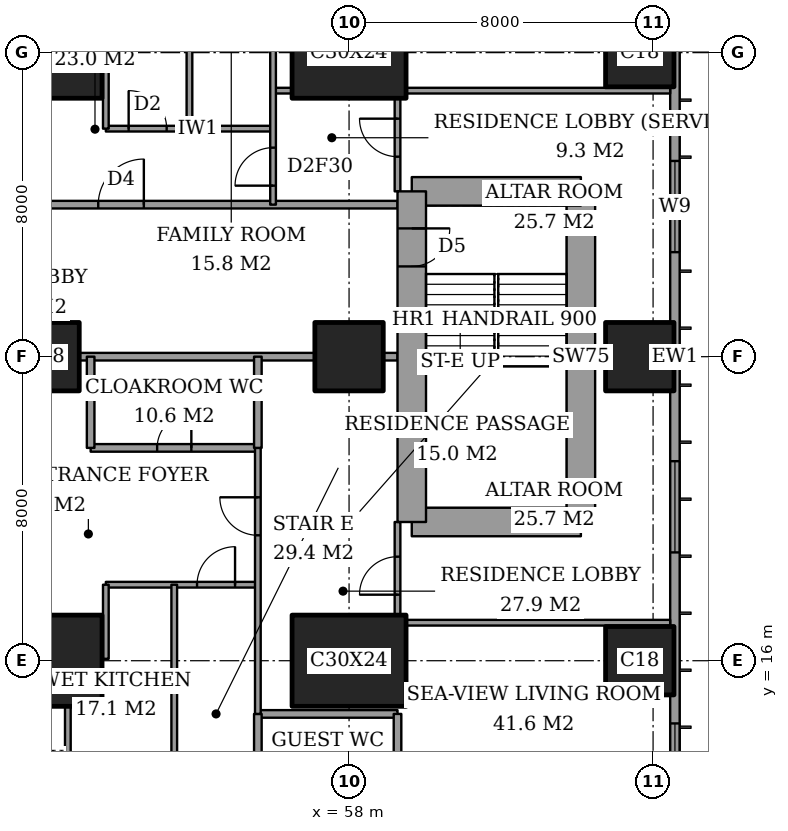
"""IFC4 building model, lengths in metres.
Left out: names, types, materials, properties, quantities, classifications, styles, units other than length and angle.
Written with IfcOpenShell. Run it as: python <this file> out.ifc"""

import sys

from ifc_helpers import new_model, si_unit, direction, frame, frame_2d, origin, origin_2d, place, context, subcontext, project, spatial, rectangle, extrude, element, fill, save


model = new_model("IFC4")
c1 = context("Model", 3, precision=1e-05, world=origin(), true_north=direction((0.0, 1.0)))
c2 = subcontext(c1, "Body", "Model", "MODEL_VIEW")
j1 = project(units=[si_unit("LENGTHUNIT", "METRE"), si_unit("PLANEANGLEUNIT", "RADIAN")], contexts=[c1])
p1 = place(None, origin())
s1 = spatial("IfcSite", under=j1, at=p1, CompositionType="ELEMENT")
p2 = place(p1, origin())
s2 = spatial("IfcBuilding", under=s1, at=p2, CompositionType="ELEMENT")
p3 = place(p2, frame((0.0, 0.0, 203.8)))
s3 = spatial("IfcBuildingStorey", under=s2, at=p3, CompositionType="ELEMENT", Elevation=203.8)
p4 = place(p3, frame((50.0, 16.0, 0.0), z_axis=(0.0, 0.0, 1.0), x_axis=(1.0, 0.0, 0.0)))
e1 = element("IfcColumn", 1, at=p4, inside=s3, PredefinedType="COLUMN", context=c2, shape_type="SweptSolid", body=[
    extrude(rectangle(XDim=3.0, YDim=2.4, at=origin_2d()), origin(), (0.0, 0.0, 1.0), 3.6),
])
p5 = place(p3, frame((50.0, 24.0, 0.0), z_axis=(0.0, 0.0, 1.0), x_axis=(1.0, 0.0, 0.0)))
e2 = element("IfcColumn", 2, at=p5, inside=s3, PredefinedType="COLUMN", context=c2, shape_type="SweptSolid", body=[
    extrude(rectangle(XDim=1.8, YDim=1.8, at=origin_2d()), origin(), (0.0, 0.0, 1.0), 3.6),
])
for number, where, z_axis, x_axis in (
    (3, (50.0, 32.0, 0.0), (0.0, 0.0, 1.0), (1.0, 0.0, 0.0)),
    (4, (58.0, 16.0, 0.0), (0.0, 0.0, 1.0), (1.0, 0.0, 0.0)),
):
    element("IfcColumn", number, at=place(p3, frame(where, z_axis=z_axis, x_axis=x_axis)), inside=s3, PredefinedType="COLUMN", context=c2, shape_type="SweptSolid", body=[
        extrude(rectangle(XDim=3.0, YDim=2.4, at=origin_2d()), origin(), (0.0, 0.0, 1.0), 3.6),
    ])
p6 = place(p3, frame((58.0, 24.0, 0.0), z_axis=(0.0, 0.0, 1.0), x_axis=(1.0, 0.0, 0.0)))
e5 = element("IfcColumn", 5, at=p6, inside=s3, PredefinedType="COLUMN", context=c2, shape_type="SweptSolid", body=[
    extrude(rectangle(XDim=1.8, YDim=1.8, at=origin_2d()), origin(), (0.0, 0.0, 1.0), 3.6),
])
p7 = place(p3, frame((58.0, 32.0, 0.0), z_axis=(0.0, 0.0, 1.0), x_axis=(1.0, 0.0, 0.0)))
e6 = element("IfcColumn", 6, at=p7, inside=s3, PredefinedType="COLUMN", context=c2, shape_type="SweptSolid", body=[
    extrude(rectangle(XDim=3.0, YDim=2.4, at=origin_2d()), origin(), (0.0, 0.0, 1.0), 3.6),
])
for number, where, z_axis, x_axis in (
    (7, (65.65, 16.0, 0.0), (0.0, 0.0, 1.0), (1.0, 0.0, 0.0)),
    (8, (65.65, 24.0, 0.0), (0.0, 0.0, 1.0), (1.0, 0.0, 0.0)),
    (9, (65.65, 32.0, 0.0), (0.0, 0.0, 1.0), (1.0, 0.0, 0.0)),
):
    element("IfcColumn", number, at=place(p3, frame(where, z_axis=z_axis, x_axis=x_axis)), inside=s3, PredefinedType="COLUMN", context=c2, shape_type="SweptSolid", body=[
        extrude(rectangle(XDim=1.8, YDim=1.8, at=origin_2d()), origin(), (0.0, 0.0, 1.0), 3.6),
    ])
p8 = place(p3, frame((59.65, 19.65, 0.0), z_axis=(0.0, 0.0, 1.0), x_axis=(1.0, 0.0, 0.0)))
e10 = element("IfcWall", 10, at=p8, inside=s3, PredefinedType="SHEAR", context=c2, shape_type="SweptSolid", body=[
    extrude(rectangle(XDim=4.45, YDim=0.75, at=frame_2d((2.225, 0.0))), origin(), (0.0, 0.0, 1.0), 3.6),
])
p9 = place(p3, frame((64.1, 19.65, 0.0), z_axis=(0.0, 0.0, 1.0), x_axis=(0.0, 1.0, 0.0)))
e11 = element("IfcWall", 11, at=p9, inside=s3, PredefinedType="SHEAR", context=c2, shape_type="SweptSolid", body=[
    extrude(rectangle(XDim=8.7, YDim=0.75, at=frame_2d((4.35, 0.0))), origin(), (0.0, 0.0, 1.0), 3.6),
])
p10 = place(p3, frame((64.1, 28.35, 0.0), z_axis=(0.0, 0.0, 1.0), x_axis=(-1.0, 0.0, 0.0)))
e12 = element("IfcWall", 12, at=p10, inside=s3, PredefinedType="SHEAR", context=c2, shape_type="SweptSolid", body=[
    extrude(rectangle(XDim=4.45, YDim=0.75, at=frame_2d((2.225, 0.0))), origin(), (0.0, 0.0, 1.0), 3.6),
])
p11 = place(p3, frame((59.65, 28.35, 0.0), z_axis=(0.0, 0.0, 1.0), x_axis=(0.0, -1.0, 0.0)))
e13 = element("IfcWall", 13, at=p11, inside=s3, PredefinedType="SHEAR", context=c2, shape_type="SweptSolid", body=[
    extrude(rectangle(XDim=8.7, YDim=0.75, at=frame_2d((4.35, 0.0))), origin(), (0.0, 0.0, 1.0), 3.6),
])
p12 = place(p11, frame((0.975, 0.0, 0.0)))
e14 = element("IfcOpeningElement", 14, at=p12, cuts=e13, PredefinedType="OPENING", context=c2, shape_type="SweptSolid", body=[
    extrude(rectangle(XDim=1.0, YDim=2.1, at=frame_2d((0.5, 1.05))), frame((0.0, 0.385, 0.0), z_axis=(0.0, -1.0, 0.0), x_axis=(1.0, 0.0, 0.0)), (0.0, 0.0, 1.0), 0.77),
])
p13 = place(p3, frame((66.575, 3.175, 0.0), z_axis=(0.0, 0.0, 1.0), x_axis=(0.0, 1.0, 0.0)))
e15 = element("IfcWall", 15, at=p13, inside=s3, PredefinedType="SOLIDWALL", context=c2, shape_type="SweptSolid", body=[
    extrude(rectangle(XDim=41.65, YDim=0.25, at=frame_2d((20.825, 0.0))), origin(), (0.0, 0.0, 1.0), 3.6),
])
p14 = place(p13, frame((0.825, 0.0, 0.2)))
e16 = element("IfcOpeningElement", 16, at=p14, cuts=e15, PredefinedType="OPENING", context=c2, shape_type="SweptSolid", body=[
    extrude(rectangle(XDim=2.4, YDim=2.4, at=frame_2d((1.2, 1.2))), frame((0.0, 0.135, 0.0), z_axis=(0.0, -1.0, 0.0), x_axis=(1.0, 0.0, 0.0)), (0.0, 0.0, 1.0), 0.27),
])
p15 = place(p13, frame((6.6, 0.0, 0.2)))
e17 = element("IfcOpeningElement", 17, at=p15, cuts=e15, PredefinedType="OPENING", context=c2, shape_type="SweptSolid", body=[
    extrude(rectangle(XDim=1.2, YDim=2.4, at=frame_2d((0.6, 1.2))), frame((0.0, 0.135, 0.0), z_axis=(0.0, -1.0, 0.0), x_axis=(1.0, 0.0, 0.0)), (0.0, 0.0, 1.0), 0.27),
])
p16 = place(p13, frame((8.775, 0.0, 0.2)))
e18 = element("IfcOpeningElement", 18, at=p16, cuts=e15, PredefinedType="OPENING", context=c2, shape_type="SweptSolid", body=[
    extrude(rectangle(XDim=2.4, YDim=2.4, at=frame_2d((1.2, 1.2))), frame((0.0, 0.135, 0.0), z_axis=(0.0, -1.0, 0.0), x_axis=(1.0, 0.0, 0.0)), (0.0, 0.0, 1.0), 0.27),
])
p17 = place(p13, frame((15.675, 0.0, 0.2)))
e19 = element("IfcOpeningElement", 19, at=p17, cuts=e15, PredefinedType="OPENING", context=c2, shape_type="SweptSolid", body=[
    extrude(rectangle(XDim=2.4, YDim=2.4, at=frame_2d((1.2, 1.2))), frame((0.0, 0.135, 0.0), z_axis=(0.0, -1.0, 0.0), x_axis=(1.0, 0.0, 0.0)), (0.0, 0.0, 1.0), 0.27),
])
p18 = place(p13, frame((23.575, 0.0, 0.2)))
e20 = element("IfcOpeningElement", 20, at=p18, cuts=e15, PredefinedType="OPENING", context=c2, shape_type="SweptSolid", body=[
    extrude(rectangle(XDim=2.4, YDim=2.4, at=frame_2d((1.2, 1.2))), frame((0.0, 0.135, 0.0), z_axis=(0.0, -1.0, 0.0), x_axis=(1.0, 0.0, 0.0)), (0.0, 0.0, 1.0), 0.27),
])
p19 = place(p13, frame((30.675, 0.0, 0.2)))
e21 = element("IfcOpeningElement", 21, at=p19, cuts=e15, PredefinedType="OPENING", context=c2, shape_type="SweptSolid", body=[
    extrude(rectangle(XDim=2.4, YDim=2.4, at=frame_2d((1.2, 1.2))), frame((0.0, 0.135, 0.0), z_axis=(0.0, -1.0, 0.0), x_axis=(1.0, 0.0, 0.0)), (0.0, 0.0, 1.0), 0.27),
])
p20 = place(p13, frame((34.325, 0.0, 0.2)))
e22 = element("IfcOpeningElement", 22, at=p20, cuts=e15, PredefinedType="OPENING", context=c2, shape_type="SweptSolid", body=[
    extrude(rectangle(XDim=1.2, YDim=2.4, at=frame_2d((0.6, 1.2))), frame((0.0, 0.135, 0.0), z_axis=(0.0, -1.0, 0.0), x_axis=(1.0, 0.0, 0.0)), (0.0, 0.0, 1.0), 0.27),
])
p21 = place(p13, frame((38.425, 0.0, 0.2)))
e23 = element("IfcOpeningElement", 23, at=p21, cuts=e15, PredefinedType="OPENING", context=c2, shape_type="SweptSolid", body=[
    extrude(rectangle(XDim=2.4, YDim=2.4, at=frame_2d((1.2, 1.2))), frame((0.0, 0.135, 0.0), z_axis=(0.0, -1.0, 0.0), x_axis=(1.0, 0.0, 0.0)), (0.0, 0.0, 1.0), 0.27),
])
p22 = place(p3, frame((55.6, 14.6, 0.0), z_axis=(0.0, 0.0, 1.0), x_axis=(1.0, 0.0, 0.0)))
e24 = element("IfcWall", 24, at=p22, inside=s3, PredefinedType="PARTITIONING", context=c2, shape_type="SweptSolid", body=[
    extrude(rectangle(XDim=3.675, YDim=0.2, at=frame_2d((1.837, 0.0))), origin(), (0.0, 0.0, 1.0), 3.35),
])
p23 = place(p3, frame((59.5, 17.0, 0.0), z_axis=(0.0, 0.0, 1.0), x_axis=(1.0, 0.0, 0.0)))
e25 = element("IfcWall", 25, at=p23, inside=s3, PredefinedType="PARTITIONING", context=c2, shape_type="SweptSolid", body=[
    extrude(rectangle(XDim=6.95, YDim=0.15, at=frame_2d((3.475, 0.0))), origin(), (0.0, 0.0, 1.0), 3.35),
])
p24 = place(p3, frame((51.6, 18.0, 0.0), z_axis=(0.0, 0.0, 1.0), x_axis=(1.0, 0.0, 0.0)))
e26 = element("IfcWall", 26, at=p24, inside=s3, PredefinedType="PARTITIONING", context=c2, shape_type="SweptSolid", body=[
    extrude(rectangle(XDim=4.0, YDim=0.15, at=frame_2d((2.0, 0.0))), origin(), (0.0, 0.0, 1.0), 3.35),
])
p25 = place(p24, frame((2.4, 0.0, 0.0)))
e27 = element("IfcOpeningElement", 27, at=p25, cuts=e26, PredefinedType="OPENING", context=c2, shape_type="SweptSolid", body=[
    extrude(rectangle(XDim=1.0, YDim=2.1, at=frame_2d((0.5, 1.05))), frame((0.0, 0.085, 0.0), z_axis=(0.0, -1.0, 0.0), x_axis=(1.0, 0.0, 0.0)), (0.0, 0.0, 1.0), 0.17),
])
p26 = place(p3, frame((51.2, 21.6, 0.0), z_axis=(0.0, 0.0, 1.0), x_axis=(1.0, 0.0, 0.0)))
e28 = element("IfcWall", 28, at=p26, inside=s3, PredefinedType="PARTITIONING", context=c2, shape_type="SweptSolid", body=[
    extrude(rectangle(XDim=4.4, YDim=0.2, at=frame_2d((2.2, 0.0))), origin(), (0.0, 0.0, 1.0), 3.35),
])
p27 = place(p26, frame((1.75, 0.0, 0.0)))
e29 = element("IfcOpeningElement", 29, at=p27, cuts=e28, PredefinedType="OPENING", context=c2, shape_type="SweptSolid", body=[
    extrude(rectangle(XDim=0.9, YDim=2.1, at=frame_2d((0.45, 1.05))), frame((0.0, 0.11, 0.0), z_axis=(0.0, -1.0, 0.0), x_axis=(1.0, 0.0, 0.0)), (0.0, 0.0, 1.0), 0.22),
])
p28 = place(p3, frame((50.9, 24.0, 0.0), z_axis=(0.0, 0.0, 1.0), x_axis=(1.0, 0.0, 0.0)))
e30 = element("IfcWall", 30, at=p28, inside=s3, PredefinedType="PARTITIONING", context=c2, shape_type="SweptSolid", body=[
    extrude(rectangle(XDim=6.2, YDim=0.2, at=frame_2d((3.1, 0.0))), origin(), (0.0, 0.0, 1.0), 3.35),
])
p29 = place(p3, frame((58.9, 24.0, 0.0), z_axis=(0.0, 0.0, 1.0), x_axis=(1.0, 0.0, 0.0)))
e31 = element("IfcWall", 31, at=p29, inside=s3, PredefinedType="PARTITIONING", context=c2, shape_type="SweptSolid", body=[
    extrude(rectangle(XDim=0.375, YDim=0.2, at=frame_2d((0.188, 0.0))), origin(), (0.0, 0.0, 1.0), 3.35),
])
p30 = place(p3, frame((42.0, 28.0, 0.0), z_axis=(0.0, 0.0, 1.0), x_axis=(1.0, 0.0, 0.0)))
e32 = element("IfcWall", 32, at=p30, inside=s3, PredefinedType="PARTITIONING", context=c2, shape_type="SweptSolid", body=[
    extrude(rectangle(XDim=17.275, YDim=0.2, at=frame_2d((8.637, 0.0))), origin(), (0.0, 0.0, 1.0), 3.35),
])
p31 = place(p30, frame((9.4, 0.0, 0.0)))
e33 = element("IfcOpeningElement", 33, at=p31, cuts=e32, PredefinedType="OPENING", context=c2, shape_type="SweptSolid", body=[
    extrude(rectangle(XDim=1.2, YDim=2.4, at=frame_2d((0.6, 1.2))), frame((0.0, 0.11, 0.0), z_axis=(0.0, -1.0, 0.0), x_axis=(1.0, 0.0, 0.0)), (0.0, 0.0, 1.0), 0.22),
])
p32 = place(p3, frame((51.6, 30.0, 0.0), z_axis=(0.0, 0.0, 1.0), x_axis=(1.0, 0.0, 0.0)))
e34 = element("IfcWall", 34, at=p32, inside=s3, PredefinedType="PARTITIONING", context=c2, shape_type="SweptSolid", body=[
    extrude(rectangle(XDim=4.4, YDim=0.15, at=frame_2d((2.2, 0.0))), origin(), (0.0, 0.0, 1.0), 3.35),
])
p33 = place(p32, frame((0.6, 0.0, 0.0)))
e35 = element("IfcOpeningElement", 35, at=p33, cuts=e34, PredefinedType="OPENING", context=c2, shape_type="SweptSolid", body=[
    extrude(rectangle(XDim=1.0, YDim=2.1, at=frame_2d((0.5, 1.05))), frame((0.0, 0.085, 0.0), z_axis=(0.0, -1.0, 0.0), x_axis=(1.0, 0.0, 0.0)), (0.0, 0.0, 1.0), 0.17),
])
p34 = place(p3, frame((56.0, 31.0, 0.0), z_axis=(0.0, 0.0, 1.0), x_axis=(1.0, 0.0, 0.0)))
e36 = element("IfcWall", 36, at=p34, inside=s3, PredefinedType="PARTITIONING", context=c2, shape_type="SweptSolid", body=[
    extrude(rectangle(XDim=0.5, YDim=0.15, at=frame_2d((0.25, 0.0))), origin(), (0.0, 0.0, 1.0), 3.35),
])
p35 = place(p3, frame((59.5, 31.0, 0.0), z_axis=(0.0, 0.0, 1.0), x_axis=(1.0, 0.0, 0.0)))
e37 = element("IfcWall", 37, at=p35, inside=s3, PredefinedType="PARTITIONING", context=c2, shape_type="SweptSolid", body=[
    extrude(rectangle(XDim=6.95, YDim=0.15, at=frame_2d((3.475, 0.0))), origin(), (0.0, 0.0, 1.0), 3.35),
])
p36 = place(p3, frame((50.6, 11.2, 0.0), z_axis=(0.0, 0.0, 1.0), x_axis=(0.0, 1.0, 0.0)))
e38 = element("IfcWall", 38, at=p36, inside=s3, PredefinedType="PARTITIONING", context=c2, shape_type="SweptSolid", body=[
    extrude(rectangle(XDim=3.6, YDim=0.15, at=frame_2d((1.8, 0.0))), origin(), (0.0, 0.0, 1.0), 3.35),
])
p37 = place(p3, frame((51.2, 21.6, 0.0), z_axis=(0.0, 0.0, 1.0), x_axis=(0.0, 1.0, 0.0)))
e39 = element("IfcWall", 39, at=p37, inside=s3, PredefinedType="PARTITIONING", context=c2, shape_type="SweptSolid", body=[
    extrude(rectangle(XDim=2.4, YDim=0.2, at=frame_2d((1.2, 0.0))), origin(), (0.0, 0.0, 1.0), 3.35),
])
p38 = place(p3, frame((51.6, 16.05, 0.0), z_axis=(0.0, 0.0, 1.0), x_axis=(0.0, 1.0, 0.0)))
e40 = element("IfcWall", 40, at=p38, inside=s3, PredefinedType="PARTITIONING", context=c2, shape_type="SweptSolid", body=[
    extrude(rectangle(XDim=1.95, YDim=0.15, at=frame_2d((0.975, 0.0))), origin(), (0.0, 0.0, 1.0), 3.35),
])
p39 = place(p3, frame((51.6, 30.0, 0.0), z_axis=(0.0, 0.0, 1.0), x_axis=(0.0, 1.0, 0.0)))
e41 = element("IfcWall", 41, at=p39, inside=s3, PredefinedType="PARTITIONING", context=c2, shape_type="SweptSolid", body=[
    extrude(rectangle(XDim=7.2, YDim=0.15, at=frame_2d((3.6, 0.0))), origin(), (0.0, 0.0, 1.0), 3.35),
])
p40 = place(p3, frame((53.4, 11.2, 0.0), z_axis=(0.0, 0.0, 1.0), x_axis=(0.0, 1.0, 0.0)))
e42 = element("IfcWall", 42, at=p40, inside=s3, PredefinedType="PARTITIONING", context=c2, shape_type="SweptSolid", body=[
    extrude(rectangle(XDim=6.8, YDim=0.15, at=frame_2d((3.4, 0.0))), origin(), (0.0, 0.0, 1.0), 3.35),
])
p41 = place(p3, frame((53.8, 30.0, 0.0), z_axis=(0.0, 0.0, 1.0), x_axis=(0.0, 1.0, 0.0)))
e43 = element("IfcWall", 43, at=p41, inside=s3, PredefinedType="PARTITIONING", context=c2, shape_type="SweptSolid", body=[
    extrude(rectangle(XDim=7.2, YDim=0.15, at=frame_2d((3.6, 0.0))), origin(), (0.0, 0.0, 1.0), 3.35),
])
p42 = place(p3, frame((55.6, 11.2, 0.0), z_axis=(0.0, 0.0, 1.0), x_axis=(0.0, 1.0, 0.0)))
e44 = element("IfcWall", 44, at=p42, inside=s3, PredefinedType="PARTITIONING", context=c2, shape_type="SweptSolid", body=[
    extrude(rectangle(XDim=3.4, YDim=0.2, at=frame_2d((1.7, 0.0))), origin(), (0.0, 0.0, 1.0), 3.35),
])
p43 = place(p3, frame((55.6, 21.6, 0.0), z_axis=(0.0, 0.0, 1.0), x_axis=(0.0, 1.0, 0.0)))
e45 = element("IfcWall", 45, at=p43, inside=s3, PredefinedType="PARTITIONING", context=c2, shape_type="SweptSolid", body=[
    extrude(rectangle(XDim=2.4, YDim=0.2, at=frame_2d((1.2, 0.0))), origin(), (0.0, 0.0, 1.0), 3.35),
])
p44 = place(p3, frame((55.6, 14.6, 0.0), z_axis=(0.0, 0.0, 1.0), x_axis=(0.0, 1.0, 0.0)))
e46 = element("IfcWall", 46, at=p44, inside=s3, PredefinedType="PARTITIONING", context=c2, shape_type="SweptSolid", body=[
    extrude(rectangle(XDim=7.0, YDim=0.15, at=frame_2d((3.5, 0.0))), origin(), (0.0, 0.0, 1.0), 3.35),
])
p45 = place(p44, frame((4.7, 0.0, 0.0)))
e47 = element("IfcOpeningElement", 47, at=p45, cuts=e46, PredefinedType="OPENING", context=c2, shape_type="SweptSolid", body=[
    extrude(rectangle(XDim=1.0, YDim=2.1, at=frame_2d((0.5, 1.05))), frame((0.0, 0.085, 0.0), z_axis=(0.0, -1.0, 0.0), x_axis=(1.0, 0.0, 0.0)), (0.0, 0.0, 1.0), 0.17),
])
p46 = place(p3, frame((56.0, 28.0, 0.0), z_axis=(0.0, 0.0, 1.0), x_axis=(0.0, 1.0, 0.0)))
e48 = element("IfcWall", 48, at=p46, inside=s3, PredefinedType="PARTITIONING", context=c2, shape_type="SweptSolid", body=[
    extrude(rectangle(XDim=9.2, YDim=0.15, at=frame_2d((4.6, 0.0))), origin(), (0.0, 0.0, 1.0), 3.35),
])
p47 = place(p46, frame((0.5, 0.0, 0.0)))
e49 = element("IfcOpeningElement", 49, at=p47, cuts=e48, PredefinedType="OPENING", context=c2, shape_type="SweptSolid", body=[
    extrude(rectangle(XDim=1.0, YDim=2.1, at=frame_2d((0.5, 1.05))), frame((0.0, 0.085, 0.0), z_axis=(0.0, -1.0, 0.0), x_axis=(1.0, 0.0, 0.0)), (0.0, 0.0, 1.0), 0.17),
])
p48 = place(p3, frame((59.275, 11.2, 0.0), z_axis=(0.0, 0.0, 1.0), x_axis=(0.0, 1.0, 0.0)))
e50 = element("IfcWall", 50, at=p48, inside=s3, PredefinedType="PARTITIONING", context=c2, shape_type="SweptSolid", body=[
    extrude(rectangle(XDim=3.4, YDim=0.2, at=frame_2d((1.7, 0.0))), origin(), (0.0, 0.0, 1.0), 3.35),
])
p49 = place(p3, frame((59.275, 17.2, 0.0), z_axis=(0.0, 0.0, 1.0), x_axis=(0.0, 1.0, 0.0)))
e51 = element("IfcWall", 51, at=p49, inside=s3, PredefinedType="PARTITIONING", context=c2, shape_type="SweptSolid", body=[
    extrude(rectangle(XDim=2.45, YDim=0.15, at=frame_2d((1.225, 0.0))), origin(), (0.0, 0.0, 1.0), 3.35),
])
p50 = place(p49, frame((0.538, 0.0, 0.0)))
e52 = element("IfcOpeningElement", 52, at=p50, cuts=e51, PredefinedType="OPENING", context=c2, shape_type="SweptSolid", body=[
    extrude(rectangle(XDim=1.0, YDim=2.1, at=frame_2d((0.5, 1.05))), frame((0.0, 0.085, 0.0), z_axis=(0.0, -1.0, 0.0), x_axis=(1.0, 0.0, 0.0)), (0.0, 0.0, 1.0), 0.17),
])
p51 = place(p3, frame((59.275, 28.35, 0.0), z_axis=(0.0, 0.0, 1.0), x_axis=(0.0, 1.0, 0.0)))
e53 = element("IfcWall", 53, at=p51, inside=s3, PredefinedType="PARTITIONING", context=c2, shape_type="SweptSolid", body=[
    extrude(rectangle(XDim=2.45, YDim=0.15, at=frame_2d((1.225, 0.0))), origin(), (0.0, 0.0, 1.0), 3.35),
])
p52 = place(p51, frame((0.913, 0.0, 0.0)))
e54 = element("IfcOpeningElement", 54, at=p52, cuts=e53, PredefinedType="OPENING", context=c2, shape_type="SweptSolid", body=[
    extrude(rectangle(XDim=1.0, YDim=2.1, at=frame_2d((0.5, 1.05))), frame((0.0, 0.085, 0.0), z_axis=(0.0, -1.0, 0.0), x_axis=(1.0, 0.0, 0.0)), (0.0, 0.0, 1.0), 0.17),
])
p53 = place(p16, origin())
e55 = element("IfcWindow", 55, at=p53, inside=s3, PartitioningType="SINGLE_PANEL", PredefinedType="WINDOW", context=c2, shape_type="SweptSolid", body=[
    extrude(rectangle(XDim=2.4, YDim=2.4, at=frame_2d((1.2, 1.2))), frame((0.0, 0.03, 0.0), z_axis=(0.0, -1.0, 0.0), x_axis=(1.0, 0.0, 0.0)), (0.0, 0.0, 1.0), 0.06),
])
fill(e18, e55)
p54 = place(p17, origin())
e56 = element("IfcWindow", 56, at=p54, inside=s3, PartitioningType="SINGLE_PANEL", PredefinedType="WINDOW", context=c2, shape_type="SweptSolid", body=[
    extrude(rectangle(XDim=2.4, YDim=2.4, at=frame_2d((1.2, 1.2))), frame((0.0, 0.03, 0.0), z_axis=(0.0, -1.0, 0.0), x_axis=(1.0, 0.0, 0.0)), (0.0, 0.0, 1.0), 0.06),
])
fill(e19, e56)
p55 = place(p18, origin())
e57 = element("IfcWindow", 57, at=p55, inside=s3, PartitioningType="SINGLE_PANEL", PredefinedType="WINDOW", context=c2, shape_type="SweptSolid", body=[
    extrude(rectangle(XDim=2.4, YDim=2.4, at=frame_2d((1.2, 1.2))), frame((0.0, 0.03, 0.0), z_axis=(0.0, -1.0, 0.0), x_axis=(1.0, 0.0, 0.0)), (0.0, 0.0, 1.0), 0.06),
])
fill(e20, e57)
p56 = place(p50, origin())
e58 = element("IfcDoor", 58, at=p56, inside=s3, OperationType="SINGLE_SWING_RIGHT", PredefinedType="DOOR", context=c2, shape_type="SweptSolid", body=[
    extrude(rectangle(XDim=1.0, YDim=2.1, at=frame_2d((0.5, 1.05))), frame((0.0, 0.025, 0.0), z_axis=(0.0, -1.0, 0.0), x_axis=(1.0, 0.0, 0.0)), (0.0, 0.0, 1.0), 0.05),
])
fill(e52, e58)
p57 = place(p45, origin())
e59 = element("IfcDoor", 59, at=p57, inside=s3, OperationType="SINGLE_SWING_LEFT", PredefinedType="DOOR", context=c2, shape_type="SweptSolid", body=[
    extrude(rectangle(XDim=1.0, YDim=2.1, at=frame_2d((0.5, 1.05))), frame((0.0, 0.025, 0.0), z_axis=(0.0, -1.0, 0.0), x_axis=(1.0, 0.0, 0.0)), (0.0, 0.0, 1.0), 0.05),
])
fill(e47, e59)
p58 = place(p27, origin())
e60 = element("IfcDoor", 60, at=p58, inside=s3, OperationType="SINGLE_SWING_LEFT", PredefinedType="DOOR", context=c2, shape_type="SweptSolid", body=[
    extrude(rectangle(XDim=0.9, YDim=2.1, at=frame_2d((0.45, 1.05))), frame((0.0, 0.025, 0.0), z_axis=(0.0, -1.0, 0.0), x_axis=(1.0, 0.0, 0.0)), (0.0, 0.0, 1.0), 0.05),
])
fill(e29, e60)
p59 = place(p25, origin())
e61 = element("IfcDoor", 61, at=p59, inside=s3, OperationType="SINGLE_SWING_LEFT", PredefinedType="DOOR", context=c2, shape_type="SweptSolid", body=[
    extrude(rectangle(XDim=1.0, YDim=2.1, at=frame_2d((0.5, 1.05))), frame((0.0, 0.025, 0.0), z_axis=(0.0, -1.0, 0.0), x_axis=(1.0, 0.0, 0.0)), (0.0, 0.0, 1.0), 0.05),
])
fill(e27, e61)
p60 = place(p52, origin())
e62 = element("IfcDoor", 62, at=p60, inside=s3, OperationType="SINGLE_SWING_LEFT", PredefinedType="DOOR", context=c2, shape_type="SweptSolid", body=[
    extrude(rectangle(XDim=1.0, YDim=2.1, at=frame_2d((0.5, 1.05))), frame((0.0, 0.025, 0.0), z_axis=(0.0, -1.0, 0.0), x_axis=(1.0, 0.0, 0.0)), (0.0, 0.0, 1.0), 0.05),
])
fill(e54, e62)
p61 = place(p47, origin())
e63 = element("IfcDoor", 63, at=p61, inside=s3, OperationType="SINGLE_SWING_RIGHT", PredefinedType="DOOR", context=c2, shape_type="SweptSolid", body=[
    extrude(rectangle(XDim=1.0, YDim=2.1, at=frame_2d((0.5, 1.05))), frame((0.0, 0.025, 0.0), z_axis=(0.0, -1.0, 0.0), x_axis=(1.0, 0.0, 0.0)), (0.0, 0.0, 1.0), 0.05),
])
fill(e49, e63)
p62 = place(p31, origin())
e64 = element("IfcDoor", 64, at=p62, inside=s3, OperationType="SINGLE_SWING_LEFT", PredefinedType="DOOR", context=c2, shape_type="SweptSolid", body=[
    extrude(rectangle(XDim=1.2, YDim=2.4, at=frame_2d((0.6, 1.2))), frame((0.0, 0.025, 0.0), z_axis=(0.0, -1.0, 0.0), x_axis=(1.0, 0.0, 0.0)), (0.0, 0.0, 1.0), 0.05),
])
fill(e33, e64)
p63 = place(p33, origin())
e65 = element("IfcDoor", 65, at=p63, inside=s3, OperationType="SINGLE_SWING_RIGHT", PredefinedType="DOOR", context=c2, shape_type="SweptSolid", body=[
    extrude(rectangle(XDim=1.0, YDim=2.1, at=frame_2d((0.5, 1.05))), frame((0.0, 0.025, 0.0), z_axis=(0.0, -1.0, 0.0), x_axis=(1.0, 0.0, 0.0)), (0.0, 0.0, 1.0), 0.05),
])
fill(e35, e65)
p64 = place(p12, origin())
e66 = element("IfcDoor", 66, at=p64, inside=s3, OperationType="SINGLE_SWING_RIGHT", PredefinedType="DOOR", context=c2, shape_type="SweptSolid", body=[
    extrude(rectangle(XDim=1.0, YDim=2.1, at=frame_2d((0.5, 1.05))), frame((0.0, 0.025, 0.0), z_axis=(0.0, -1.0, 0.0), x_axis=(1.0, 0.0, 0.0)), (0.0, 0.0, 1.0), 0.05),
])
fill(e14, e66)
save(model, sys.argv[1])
